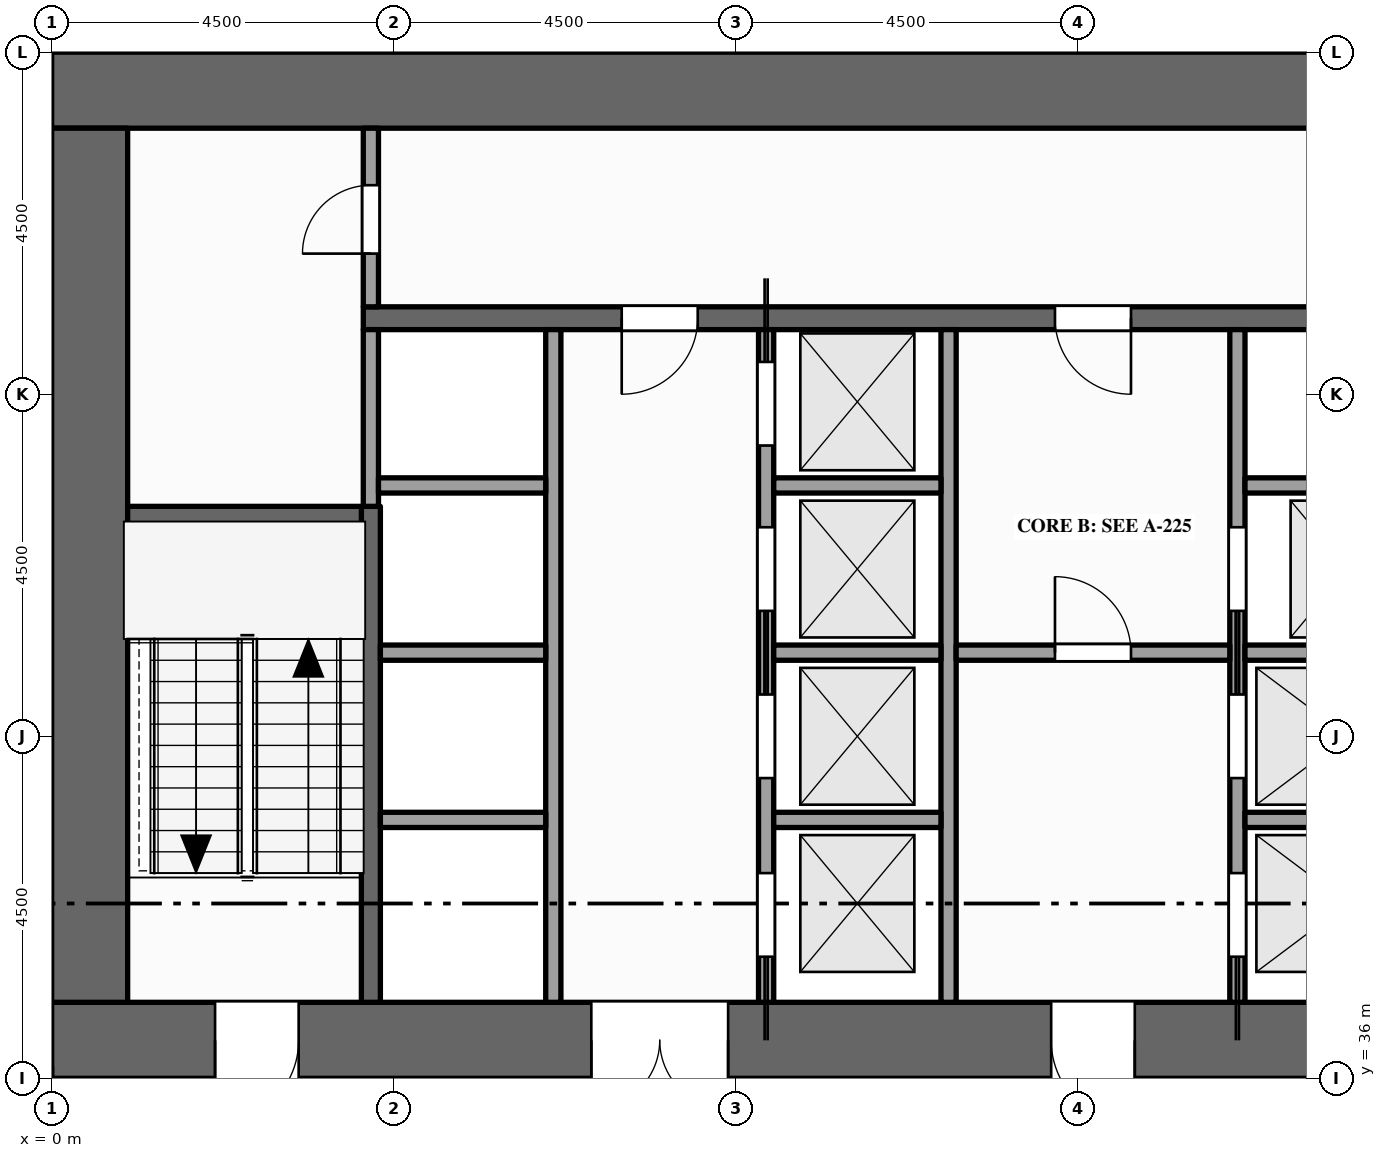
"""IFC4 building model, lengths in metres.
Left out: names, types, materials, properties, quantities, classifications, styles, units other than length and angle.
Written with IfcOpenShell. Run it as: python <this file> out.ifc"""

import sys

from ifc_helpers import new_model, si_unit, direction, frame, frame_2d, origin, place, context, subcontext, project, spatial, rectangle, extrude, element, fill, save


model = new_model("IFC4")
c1 = context("Model", 3, precision=1e-05, world=origin(), true_north=direction((0.0, 1.0)))
c2 = subcontext(c1, "Body", "Model", "MODEL_VIEW")
j1 = project(units=[si_unit("LENGTHUNIT", "METRE"), si_unit("PLANEANGLEUNIT", "RADIAN")], contexts=[c1])
p1 = place(None, origin())
s1 = spatial("IfcSite", under=j1, at=p1, CompositionType="ELEMENT")
p2 = place(p1, origin())
s2 = spatial("IfcBuilding", under=s1, at=p2, CompositionType="ELEMENT")
p3 = place(p2, frame((0.0, 0.0, 139.0)))
s3 = spatial("IfcBuildingStorey", under=s2, at=p3, CompositionType="ELEMENT", Elevation=139.0)
p4 = place(p3, frame((0.0, 36.5, -0.15), z_axis=(0.0, 0.0, 1.0), x_axis=(1.0, 0.0, 0.0)))
e1 = element("IfcWall", 1, at=p4, inside=s3, PredefinedType="SHEAR", context=c2, shape_type="SweptSolid", body=[
    extrude(rectangle(XDim=22.5, YDim=1.0, at=frame_2d((11.25, 0.0))), origin(), (0.0, 0.0, 1.0), 4.0),
])
p5 = place(p4, frame((7.1, 0.0, 0.15)))
e2 = element("IfcOpeningElement", 2, at=p5, cuts=e1, PredefinedType="OPENING", context=c2, shape_type="SweptSolid", body=[
    extrude(rectangle(XDim=1.8, YDim=2.1, at=frame_2d((0.9, 1.05))), frame((0.0, 0.51, 0.0), z_axis=(0.0, -1.0, 0.0), x_axis=(1.0, 0.0, 0.0)), (0.0, 0.0, 1.0), 1.02),
])
p6 = place(p4, frame((13.15, 0.0, 0.15)))
e3 = element("IfcOpeningElement", 3, at=p6, cuts=e1, PredefinedType="OPENING", context=c2, shape_type="SweptSolid", body=[
    extrude(rectangle(XDim=1.1, YDim=2.1, at=frame_2d((0.55, 1.05))), frame((0.0, 0.51, 0.0), z_axis=(0.0, -1.0, 0.0), x_axis=(1.0, 0.0, 0.0)), (0.0, 0.0, 1.0), 1.02),
])
p7 = place(p4, frame((2.15, 0.0, 0.15)))
e4 = element("IfcOpeningElement", 4, at=p7, cuts=e1, PredefinedType="OPENING", context=c2, shape_type="SweptSolid", body=[
    extrude(rectangle(XDim=1.1, YDim=2.1, at=frame_2d((0.55, 1.05))), frame((0.0, 0.51, 0.0), z_axis=(0.0, -1.0, 0.0), x_axis=(1.0, 0.0, 0.0)), (0.0, 0.0, 1.0), 1.02),
])
p8 = place(p4, frame((19.35, 0.0, 0.15)))
e5 = element("IfcOpeningElement", 5, at=p8, cuts=e1, PredefinedType="OPENING", context=c2, shape_type="SweptSolid", body=[
    extrude(rectangle(XDim=1.1, YDim=2.1, at=frame_2d((0.55, 1.05))), frame((0.0, 0.51, 0.0), z_axis=(0.0, -1.0, 0.0), x_axis=(1.0, 0.0, 0.0)), (0.0, 0.0, 1.0), 1.02),
])
p9 = place(p3, frame((0.0, 49.0, -0.15), z_axis=(0.0, 0.0, 1.0), x_axis=(1.0, 0.0, 0.0)))
e6 = element("IfcWall", 6, at=p9, inside=s3, PredefinedType="SHEAR", context=c2, shape_type="SweptSolid", body=[
    extrude(rectangle(XDim=22.5, YDim=1.0, at=frame_2d((11.25, 0.0))), origin(), (0.0, 0.0, 1.0), 4.0),
])
p10 = place(p3, frame((0.5, 37.0, -0.15), z_axis=(0.0, 0.0, 1.0), x_axis=(0.0, 1.0, 0.0)))
e7 = element("IfcWall", 7, at=p10, inside=s3, PredefinedType="SHEAR", context=c2, shape_type="SweptSolid", body=[
    extrude(rectangle(XDim=11.5, YDim=1.0, at=frame_2d((5.75, 0.0))), origin(), (0.0, 0.0, 1.0), 4.0),
])
p11 = place(p3, frame((0.0, 36.0, 0.0), z_axis=(0.0, 0.0, 1.0), x_axis=(-1.0, 0.0, 0.0)))
e8 = element("IfcWall", 8, at=p11, inside=s3, PredefinedType="STANDARD", context=c2, shape_type="SweptSolid", body=[
    extrude(rectangle(XDim=1.05, YDim=0.3, at=frame_2d((0.525, 0.0))), origin(), (0.0, 0.0, 1.0), 2.87),
])
p12 = place(p3, frame((4.2, 37.0, 0.0), z_axis=(0.0, 0.0, 1.0), x_axis=(0.0, 1.0, 0.0)))
e9 = element("IfcWall", 9, at=p12, inside=s3, PredefinedType="SHEAR", context=c2, shape_type="SweptSolid", body=[
    extrude(rectangle(XDim=6.525, YDim=0.25, at=frame_2d((3.262, 0.0))), origin(), (0.0, 0.0, 1.0), 3.85),
])
p13 = place(p3, frame((4.2, 43.525, 0.0), z_axis=(0.0, 0.0, 1.0), x_axis=(0.0, 1.0, 0.0)))
e10 = element("IfcWall", 10, at=p13, inside=s3, PredefinedType="SOLIDWALL", context=c2, shape_type="SweptSolid", body=[
    extrude(rectangle(XDim=2.325, YDim=0.2, at=frame_2d((1.163, 0.0))), origin(), (0.0, 0.0, 1.0), 3.85),
])
p14 = place(p3, frame((4.2, 46.15, 0.0), z_axis=(0.0, 0.0, 1.0), x_axis=(0.0, 1.0, 0.0)))
e11 = element("IfcWall", 11, at=p14, inside=s3, PredefinedType="PARTITIONING", context=c2, shape_type="SweptSolid", body=[
    extrude(rectangle(XDim=2.35, YDim=0.2, at=frame_2d((1.175, 0.0))), origin(), (0.0, 0.0, 1.0), 3.85),
])
p15 = place(p14, frame((0.7, 0.0, 0.0)))
e12 = element("IfcOpeningElement", 12, at=p15, cuts=e11, PredefinedType="OPENING", context=c2, shape_type="SweptSolid", body=[
    extrude(rectangle(XDim=0.9, YDim=2.1, at=frame_2d((0.45, 1.05))), frame((0.0, 0.11, 0.0), z_axis=(0.0, -1.0, 0.0), x_axis=(1.0, 0.0, 0.0)), (0.0, 0.0, 1.0), 0.22),
])
p16 = place(p3, frame((6.6, 37.0, 0.0), z_axis=(0.0, 0.0, 1.0), x_axis=(0.0, 1.0, 0.0)))
e13 = element("IfcWall", 13, at=p16, inside=s3, PredefinedType="SOLIDWALL", context=c2, shape_type="SweptSolid", body=[
    extrude(rectangle(XDim=8.85, YDim=0.2, at=frame_2d((4.425, 0.0))), origin(), (0.0, 0.0, 1.0), 3.85),
])
p17 = place(p3, frame((9.4, 37.0, 0.0), z_axis=(0.0, 0.0, 1.0), x_axis=(0.0, 1.0, 0.0)))
e14 = element("IfcWall", 14, at=p17, inside=s3, PredefinedType="SOLIDWALL", context=c2, shape_type="SweptSolid", body=[
    extrude(rectangle(XDim=8.85, YDim=0.2, at=frame_2d((4.425, 0.0))), origin(), (0.0, 0.0, 1.0), 3.85),
])
p18 = place(p17, frame((0.6, 0.0, 0.012)))
e15 = element("IfcOpeningElement", 15, at=p18, cuts=e14, PredefinedType="OPENING", context=c2, shape_type="SweptSolid", body=[
    extrude(rectangle(XDim=1.1, YDim=2.1, at=frame_2d((0.55, 1.05))), frame((0.0, 0.11, 0.0), z_axis=(0.0, -1.0, 0.0), x_axis=(1.0, 0.0, 0.0)), (0.0, 0.0, 1.0), 0.22),
])
p19 = place(p17, frame((2.95, 0.0, 0.012)))
e16 = element("IfcOpeningElement", 16, at=p19, cuts=e14, PredefinedType="OPENING", context=c2, shape_type="SweptSolid", body=[
    extrude(rectangle(XDim=1.1, YDim=2.1, at=frame_2d((0.55, 1.05))), frame((0.0, 0.11, 0.0), z_axis=(0.0, -1.0, 0.0), x_axis=(1.0, 0.0, 0.0)), (0.0, 0.0, 1.0), 0.22),
])
p20 = place(p17, frame((5.15, 0.0, 0.012)))
e17 = element("IfcOpeningElement", 17, at=p20, cuts=e14, PredefinedType="OPENING", context=c2, shape_type="SweptSolid", body=[
    extrude(rectangle(XDim=1.1, YDim=2.1, at=frame_2d((0.55, 1.05))), frame((0.0, 0.11, 0.0), z_axis=(0.0, -1.0, 0.0), x_axis=(1.0, 0.0, 0.0)), (0.0, 0.0, 1.0), 0.22),
])
p21 = place(p17, frame((7.325, 0.0, 0.012)))
e18 = element("IfcOpeningElement", 18, at=p21, cuts=e14, PredefinedType="OPENING", context=c2, shape_type="SweptSolid", body=[
    extrude(rectangle(XDim=1.1, YDim=2.1, at=frame_2d((0.55, 1.05))), frame((0.0, 0.11, 0.0), z_axis=(0.0, -1.0, 0.0), x_axis=(1.0, 0.0, 0.0)), (0.0, 0.0, 1.0), 0.22),
])
p22 = place(p3, frame((11.8, 37.0, 0.0), z_axis=(0.0, 0.0, 1.0), x_axis=(0.0, 1.0, 0.0)))
e19 = element("IfcWall", 19, at=p22, inside=s3, PredefinedType="SOLIDWALL", context=c2, shape_type="SweptSolid", body=[
    extrude(rectangle(XDim=8.85, YDim=0.2, at=frame_2d((4.425, 0.0))), origin(), (0.0, 0.0, 1.0), 3.85),
])
p23 = place(p3, frame((15.6, 37.0, 0.0), z_axis=(0.0, 0.0, 1.0), x_axis=(0.0, 1.0, 0.0)))
e20 = element("IfcWall", 20, at=p23, inside=s3, PredefinedType="SOLIDWALL", context=c2, shape_type="SweptSolid", body=[
    extrude(rectangle(XDim=8.85, YDim=0.2, at=frame_2d((4.425, 0.0))), origin(), (0.0, 0.0, 1.0), 3.85),
])
p24 = place(p23, frame((0.6, 0.0, 0.012)))
e21 = element("IfcOpeningElement", 21, at=p24, cuts=e20, PredefinedType="OPENING", context=c2, shape_type="SweptSolid", body=[
    extrude(rectangle(XDim=1.1, YDim=2.1, at=frame_2d((0.55, 1.05))), frame((0.0, 0.11, 0.0), z_axis=(0.0, -1.0, 0.0), x_axis=(1.0, 0.0, 0.0)), (0.0, 0.0, 1.0), 0.22),
])
p25 = place(p23, frame((2.95, 0.0, 0.012)))
e22 = element("IfcOpeningElement", 22, at=p25, cuts=e20, PredefinedType="OPENING", context=c2, shape_type="SweptSolid", body=[
    extrude(rectangle(XDim=1.1, YDim=2.1, at=frame_2d((0.55, 1.05))), frame((0.0, 0.11, 0.0), z_axis=(0.0, -1.0, 0.0), x_axis=(1.0, 0.0, 0.0)), (0.0, 0.0, 1.0), 0.22),
])
p26 = place(p23, frame((5.15, 0.0, 0.012)))
e23 = element("IfcOpeningElement", 23, at=p26, cuts=e20, PredefinedType="OPENING", context=c2, shape_type="SweptSolid", body=[
    extrude(rectangle(XDim=1.1, YDim=2.1, at=frame_2d((0.55, 1.05))), frame((0.0, 0.11, 0.0), z_axis=(0.0, -1.0, 0.0), x_axis=(1.0, 0.0, 0.0)), (0.0, 0.0, 1.0), 0.22),
])
p27 = place(p3, frame((4.325, 39.4, 0.0), z_axis=(0.0, 0.0, 1.0), x_axis=(1.0, 0.0, 0.0)))
e24 = element("IfcWall", 24, at=p27, inside=s3, PredefinedType="SOLIDWALL", context=c2, shape_type="SweptSolid", body=[
    extrude(rectangle(XDim=2.175, YDim=0.2, at=frame_2d((1.087, 0.0))), origin(), (0.0, 0.0, 1.0), 3.85),
])
p28 = place(p3, frame((9.5, 39.4, 0.0), z_axis=(0.0, 0.0, 1.0), x_axis=(1.0, 0.0, 0.0)))
e25 = element("IfcWall", 25, at=p28, inside=s3, PredefinedType="SOLIDWALL", context=c2, shape_type="SweptSolid", body=[
    extrude(rectangle(XDim=2.2, YDim=0.2, at=frame_2d((1.1, 0.0))), origin(), (0.0, 0.0, 1.0), 3.85),
])
p29 = place(p3, frame((15.7, 39.4, 0.0), z_axis=(0.0, 0.0, 1.0), x_axis=(1.0, 0.0, 0.0)))
e26 = element("IfcWall", 26, at=p29, inside=s3, PredefinedType="SOLIDWALL", context=c2, shape_type="SweptSolid", body=[
    extrude(rectangle(XDim=2.675, YDim=0.2, at=frame_2d((1.337, 0.0))), origin(), (0.0, 0.0, 1.0), 3.85),
])
p30 = place(p3, frame((4.325, 41.6, 0.0), z_axis=(0.0, 0.0, 1.0), x_axis=(1.0, 0.0, 0.0)))
e27 = element("IfcWall", 27, at=p30, inside=s3, PredefinedType="SOLIDWALL", context=c2, shape_type="SweptSolid", body=[
    extrude(rectangle(XDim=2.175, YDim=0.2, at=frame_2d((1.087, 0.0))), origin(), (0.0, 0.0, 1.0), 3.85),
])
p31 = place(p3, frame((9.5, 41.6, 0.0), z_axis=(0.0, 0.0, 1.0), x_axis=(1.0, 0.0, 0.0)))
e28 = element("IfcWall", 28, at=p31, inside=s3, PredefinedType="SOLIDWALL", context=c2, shape_type="SweptSolid", body=[
    extrude(rectangle(XDim=2.2, YDim=0.2, at=frame_2d((1.1, 0.0))), origin(), (0.0, 0.0, 1.0), 3.85),
])
p32 = place(p3, frame((11.9, 41.6, 0.0), z_axis=(0.0, 0.0, 1.0), x_axis=(1.0, 0.0, 0.0)))
e29 = element("IfcWall", 29, at=p32, inside=s3, PredefinedType="PARTITIONING", context=c2, shape_type="SweptSolid", body=[
    extrude(rectangle(XDim=3.6, YDim=0.2, at=frame_2d((1.8, 0.0))), origin(), (0.0, 0.0, 1.0), 3.85),
])
p33 = place(p32, frame((1.3, 0.0, 0.0)))
e30 = element("IfcOpeningElement", 30, at=p33, cuts=e29, PredefinedType="OPENING", context=c2, shape_type="SweptSolid", body=[
    extrude(rectangle(XDim=1.0, YDim=2.1, at=frame_2d((0.5, 1.05))), frame((0.0, 0.11, 0.0), z_axis=(0.0, -1.0, 0.0), x_axis=(1.0, 0.0, 0.0)), (0.0, 0.0, 1.0), 0.22),
])
p34 = place(p3, frame((15.7, 41.6, 0.0), z_axis=(0.0, 0.0, 1.0), x_axis=(1.0, 0.0, 0.0)))
e31 = element("IfcWall", 31, at=p34, inside=s3, PredefinedType="SOLIDWALL", context=c2, shape_type="SweptSolid", body=[
    extrude(rectangle(XDim=2.675, YDim=0.2, at=frame_2d((1.337, 0.0))), origin(), (0.0, 0.0, 1.0), 3.85),
])
p35 = place(p3, frame((1.0, 43.4, 0.0), z_axis=(0.0, 0.0, 1.0), x_axis=(1.0, 0.0, 0.0)))
e32 = element("IfcWall", 32, at=p35, inside=s3, PredefinedType="SHEAR", context=c2, shape_type="SweptSolid", body=[
    extrude(rectangle(XDim=3.075, YDim=0.25, at=frame_2d((1.538, 0.0))), origin(), (0.0, 0.0, 1.0), 3.85),
])
for number, where, z_axis, x_axis in (
    (33, (4.3, 43.8, 0.0), (0.0, 0.0, 1.0), (1.0, 0.0, 0.0)),
    (34, (9.5, 43.8, 0.0), (0.0, 0.0, 1.0), (1.0, 0.0, 0.0)),
):
    element("IfcWall", number, at=place(p3, frame(where, z_axis=z_axis, x_axis=x_axis)), inside=s3, PredefinedType="SOLIDWALL", context=c2, shape_type="SweptSolid", body=[
        extrude(rectangle(XDim=2.2, YDim=0.2, at=frame_2d((1.1, 0.0))), origin(), (0.0, 0.0, 1.0), 3.85),
    ])
p36 = place(p3, frame((15.7, 43.8, 0.0), z_axis=(0.0, 0.0, 1.0), x_axis=(1.0, 0.0, 0.0)))
e35 = element("IfcWall", 35, at=p36, inside=s3, PredefinedType="SOLIDWALL", context=c2, shape_type="SweptSolid", body=[
    extrude(rectangle(XDim=2.7, YDim=0.2, at=frame_2d((1.35, 0.0))), origin(), (0.0, 0.0, 1.0), 3.85),
])
p37 = place(p3, frame((4.1, 46.0, 0.0), z_axis=(0.0, 0.0, 1.0), x_axis=(1.0, 0.0, 0.0)))
e36 = element("IfcWall", 36, at=p37, inside=s3, PredefinedType="SHEAR", context=c2, shape_type="SweptSolid", body=[
    extrude(rectangle(XDim=14.5, YDim=0.3, at=frame_2d((7.25, 0.0))), origin(), (0.0, 0.0, 1.0), 3.85),
])
p38 = place(p37, frame((3.4, 0.0, 0.0)))
e37 = element("IfcOpeningElement", 37, at=p38, cuts=e36, PredefinedType="OPENING", context=c2, shape_type="SweptSolid", body=[
    extrude(rectangle(XDim=1.0, YDim=2.1, at=frame_2d((0.5, 1.05))), frame((0.0, 0.16, 0.0), z_axis=(0.0, -1.0, 0.0), x_axis=(1.0, 0.0, 0.0)), (0.0, 0.0, 1.0), 0.32),
])
p39 = place(p37, frame((9.1, 0.0, 0.0)))
e38 = element("IfcOpeningElement", 38, at=p39, cuts=e36, PredefinedType="OPENING", context=c2, shape_type="SweptSolid", body=[
    extrude(rectangle(XDim=1.0, YDim=2.1, at=frame_2d((0.5, 1.05))), frame((0.0, 0.16, 0.0), z_axis=(0.0, -1.0, 0.0), x_axis=(1.0, 0.0, 0.0)), (0.0, 0.0, 1.0), 0.32),
])
p40 = place(p18, origin())
e39 = element("IfcDoor", 39, at=p40, inside=s3, OperationType="SLIDING_TO_LEFT", PredefinedType="DOOR", context=c2, shape_type="SweptSolid", body=[
    extrude(rectangle(XDim=1.1, YDim=2.1, at=frame_2d((0.55, 1.05))), frame((0.0, 0.025, 0.0), z_axis=(0.0, -1.0, 0.0), x_axis=(1.0, 0.0, 0.0)), (0.0, 0.0, 1.0), 0.05),
])
fill(e15, e39)
p41 = place(p19, origin())
e40 = element("IfcDoor", 40, at=p41, inside=s3, OperationType="SLIDING_TO_RIGHT", PredefinedType="DOOR", context=c2, shape_type="SweptSolid", body=[
    extrude(rectangle(XDim=1.1, YDim=2.1, at=frame_2d((0.55, 1.05))), frame((0.0, 0.025, 0.0), z_axis=(0.0, -1.0, 0.0), x_axis=(1.0, 0.0, 0.0)), (0.0, 0.0, 1.0), 0.05),
])
fill(e16, e40)
p42 = place(p20, origin())
e41 = element("IfcDoor", 41, at=p42, inside=s3, OperationType="SLIDING_TO_LEFT", PredefinedType="DOOR", context=c2, shape_type="SweptSolid", body=[
    extrude(rectangle(XDim=1.1, YDim=2.1, at=frame_2d((0.55, 1.05))), frame((0.0, 0.025, 0.0), z_axis=(0.0, -1.0, 0.0), x_axis=(1.0, 0.0, 0.0)), (0.0, 0.0, 1.0), 0.05),
])
fill(e17, e41)
p43 = place(p21, origin())
e42 = element("IfcDoor", 42, at=p43, inside=s3, OperationType="SLIDING_TO_RIGHT", PredefinedType="DOOR", context=c2, shape_type="SweptSolid", body=[
    extrude(rectangle(XDim=1.1, YDim=2.1, at=frame_2d((0.55, 1.05))), frame((0.0, 0.025, 0.0), z_axis=(0.0, -1.0, 0.0), x_axis=(1.0, 0.0, 0.0)), (0.0, 0.0, 1.0), 0.05),
])
fill(e18, e42)
p44 = place(p24, origin())
e43 = element("IfcDoor", 43, at=p44, inside=s3, OperationType="SLIDING_TO_LEFT", PredefinedType="DOOR", context=c2, shape_type="SweptSolid", body=[
    extrude(rectangle(XDim=1.1, YDim=2.1, at=frame_2d((0.55, 1.05))), frame((0.0, 0.025, 0.0), z_axis=(0.0, -1.0, 0.0), x_axis=(1.0, 0.0, 0.0)), (0.0, 0.0, 1.0), 0.05),
])
fill(e21, e43)
p45 = place(p25, origin())
e44 = element("IfcDoor", 44, at=p45, inside=s3, OperationType="SLIDING_TO_RIGHT", PredefinedType="DOOR", context=c2, shape_type="SweptSolid", body=[
    extrude(rectangle(XDim=1.1, YDim=2.1, at=frame_2d((0.55, 1.05))), frame((0.0, 0.025, 0.0), z_axis=(0.0, -1.0, 0.0), x_axis=(1.0, 0.0, 0.0)), (0.0, 0.0, 1.0), 0.05),
])
fill(e22, e44)
p46 = place(p26, origin())
e45 = element("IfcDoor", 45, at=p46, inside=s3, OperationType="SLIDING_TO_LEFT", PredefinedType="DOOR", context=c2, shape_type="SweptSolid", body=[
    extrude(rectangle(XDim=1.1, YDim=2.1, at=frame_2d((0.55, 1.05))), frame((0.0, 0.025, 0.0), z_axis=(0.0, -1.0, 0.0), x_axis=(1.0, 0.0, 0.0)), (0.0, 0.0, 1.0), 0.05),
])
fill(e23, e45)
p47 = place(p5, origin())
e46 = element("IfcDoor", 46, at=p47, inside=s3, OperationType="DOUBLE_DOOR_SINGLE_SWING", PredefinedType="DOOR", context=c2, shape_type="SweptSolid", body=[
    extrude(rectangle(XDim=1.8, YDim=2.1, at=frame_2d((0.9, 1.05))), frame((0.0, 0.025, 0.0), z_axis=(0.0, -1.0, 0.0), x_axis=(1.0, 0.0, 0.0)), (0.0, 0.0, 1.0), 0.05),
])
fill(e2, e46)
p48 = place(p38, origin())
e47 = element("IfcDoor", 47, at=p48, inside=s3, OperationType="SINGLE_SWING_LEFT", PredefinedType="DOOR", context=c2, shape_type="SweptSolid", body=[
    extrude(rectangle(XDim=1.0, YDim=2.1, at=frame_2d((0.5, 1.05))), frame((0.0, 0.025, 0.0), z_axis=(0.0, -1.0, 0.0), x_axis=(1.0, 0.0, 0.0)), (0.0, 0.0, 1.0), 0.05),
])
fill(e37, e47)
p49 = place(p6, origin())
e48 = element("IfcDoor", 48, at=p49, inside=s3, OperationType="SINGLE_SWING_RIGHT", PredefinedType="DOOR", context=c2, shape_type="SweptSolid", body=[
    extrude(rectangle(XDim=1.1, YDim=2.1, at=frame_2d((0.55, 1.05))), frame((0.0, 0.025, 0.0), z_axis=(0.0, -1.0, 0.0), x_axis=(1.0, 0.0, 0.0)), (0.0, 0.0, 1.0), 0.05),
])
fill(e3, e48)
p50 = place(p33, origin())
e49 = element("IfcDoor", 49, at=p50, inside=s3, OperationType="SINGLE_SWING_LEFT", PredefinedType="DOOR", context=c2, shape_type="SweptSolid", body=[
    extrude(rectangle(XDim=1.0, YDim=2.1, at=frame_2d((0.5, 1.05))), frame((0.0, 0.025, 0.0), z_axis=(0.0, -1.0, 0.0), x_axis=(1.0, 0.0, 0.0)), (0.0, 0.0, 1.0), 0.05),
])
fill(e30, e49)
p51 = place(p39, origin())
e50 = element("IfcDoor", 50, at=p51, inside=s3, OperationType="SINGLE_SWING_RIGHT", PredefinedType="DOOR", context=c2, shape_type="SweptSolid", body=[
    extrude(rectangle(XDim=1.0, YDim=2.1, at=frame_2d((0.5, 1.05))), frame((0.0, 0.025, 0.0), z_axis=(0.0, -1.0, 0.0), x_axis=(1.0, 0.0, 0.0)), (0.0, 0.0, 1.0), 0.05),
])
fill(e38, e50)
p52 = place(p7, origin())
e51 = element("IfcDoor", 51, at=p52, inside=s3, OperationType="SINGLE_SWING_LEFT", PredefinedType="DOOR", context=c2, shape_type="SweptSolid", body=[
    extrude(rectangle(XDim=1.1, YDim=2.1, at=frame_2d((0.55, 1.05))), frame((0.0, 0.025, 0.0), z_axis=(0.0, -1.0, 0.0), x_axis=(1.0, 0.0, 0.0)), (0.0, 0.0, 1.0), 0.05),
])
fill(e4, e51)
p53 = place(p15, origin())
e52 = element("IfcDoor", 52, at=p53, inside=s3, OperationType="SINGLE_SWING_LEFT", PredefinedType="DOOR", context=c2, shape_type="SweptSolid", body=[
    extrude(rectangle(XDim=0.9, YDim=2.1, at=frame_2d((0.45, 1.05))), frame((0.0, 0.025, 0.0), z_axis=(0.0, -1.0, 0.0), x_axis=(1.0, 0.0, 0.0)), (0.0, 0.0, 1.0), 0.05),
])
fill(e12, e52)
save(model, sys.argv[1])
